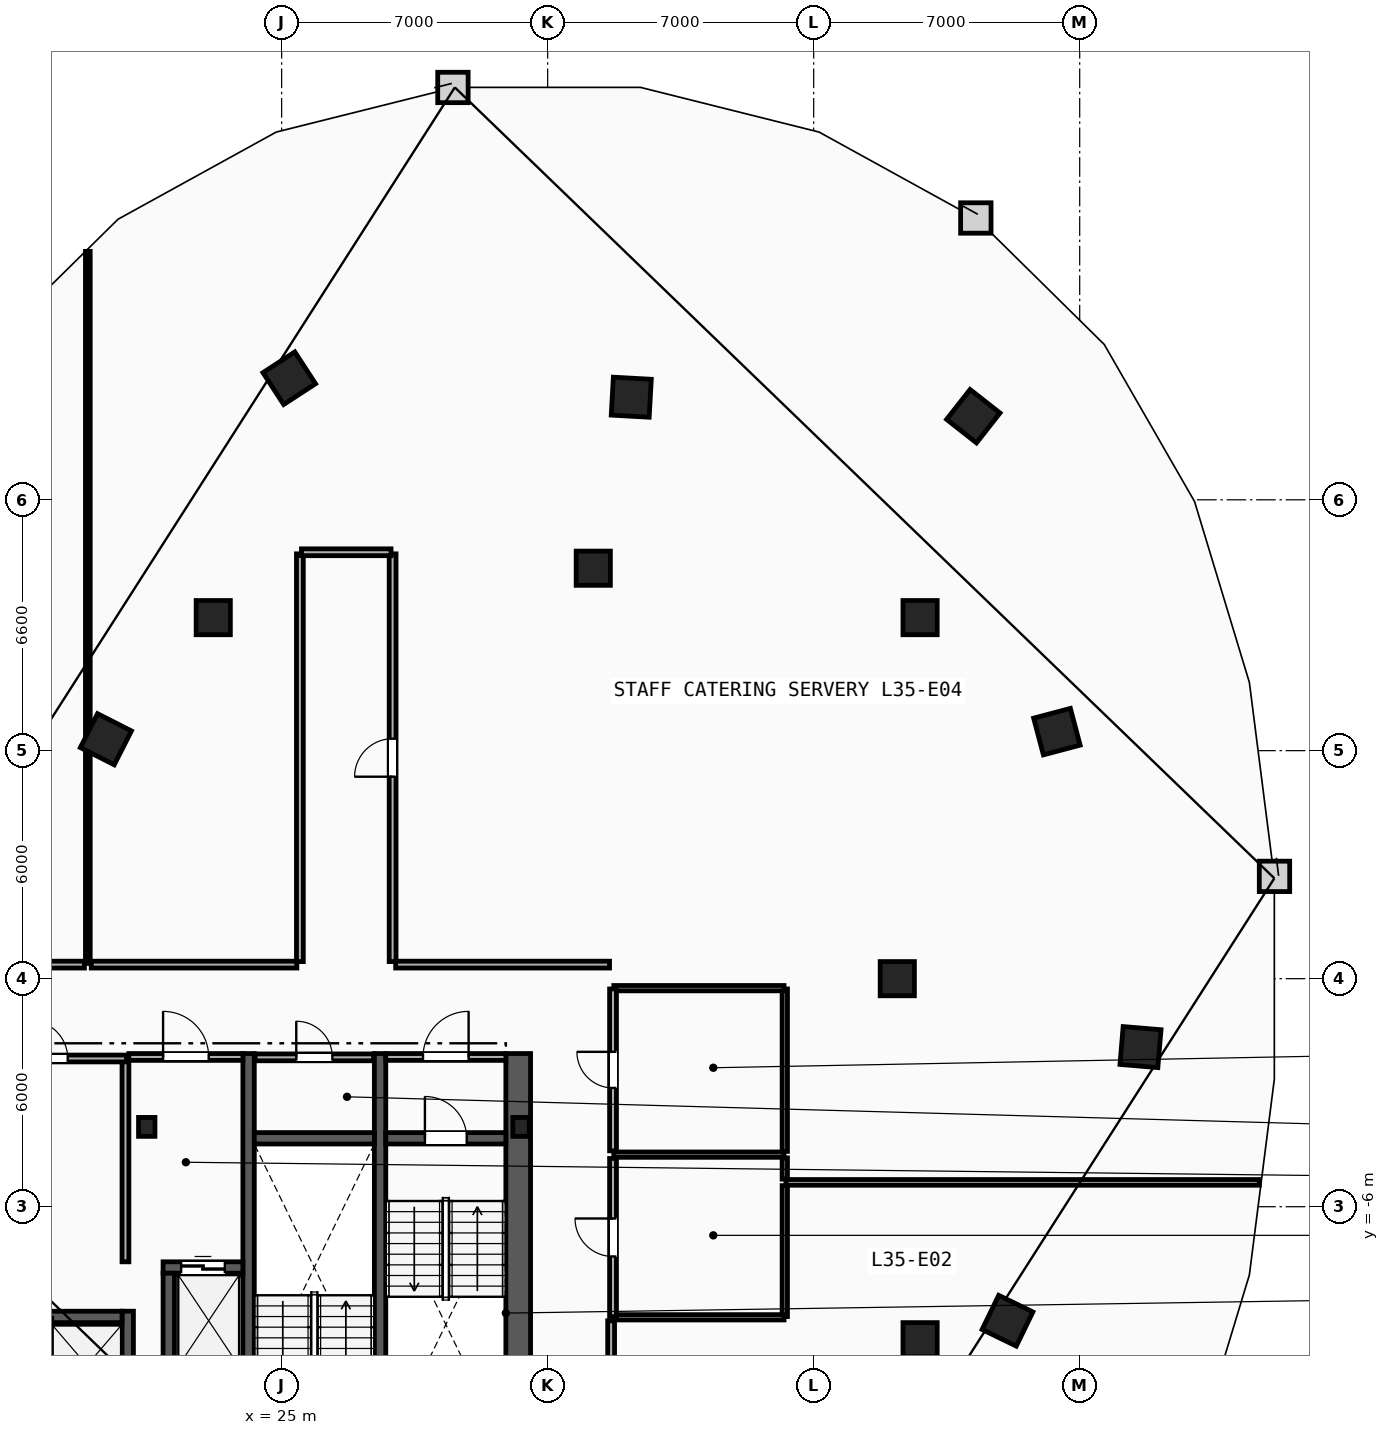
"""IFC4 building model, lengths in metres.
Left out: names, types, materials, properties, quantities, classifications, styles, units other than length and angle.
Written with IfcOpenShell. Run it as: python <this file> out.ifc"""

import sys

from ifc_helpers import new_model, si_unit, direction, frame, frame_2d, origin, origin_2d, place, context, subcontext, project, spatial, rectangle, i_section, extrude, element, fill, save


model = new_model("IFC4")
c1 = context("Model", 3, precision=1e-05, world=origin(), true_north=direction((0.0, 1.0)))
c2 = subcontext(c1, "Body", "Model", "MODEL_VIEW")
j1 = project(units=[si_unit("LENGTHUNIT", "METRE"), si_unit("PLANEANGLEUNIT", "RADIAN")], contexts=[c1])
p1 = place(None, origin())
s1 = spatial("IfcSite", under=j1, at=p1, CompositionType="ELEMENT")
p2 = place(p1, origin())
s2 = spatial("IfcBuilding", under=s1, at=p2, CompositionType="ELEMENT")
p3 = place(p2, frame((0.0, 0.0, 136.8)))
s3 = spatial("IfcBuildingStorey", under=s2, at=p3, CompositionType="ELEMENT", Elevation=136.8)
for number, where, z_axis, x_axis in (
    (1, (31.3, -3.9, 0.0), (0.0, 0.0, 1.0), (1.0, 0.0, 0.0)),
    (2, (21.45, -3.9, 0.0), (0.0, 0.0, 1.0), (1.0, 0.0, 0.0)),
):
    element("IfcColumn", number, at=place(p3, frame(where, z_axis=z_axis, x_axis=x_axis)), inside=s3, PredefinedType="COLUMN", context=c2, shape_type="SweptSolid", body=[
        extrude(i_section(OverallWidth=0.432, OverallDepth=0.498, WebThickness=0.056, FlangeThickness=0.089, FilletRadius=0.018, at=origin_2d()), origin(), (0.0, 0.0, 1.0), 3.6),
    ])
for number, where, z_axis, x_axis in (
    (3, (41.2, 0.0, 0.0), (0.0, 0.0, 1.0), (1.0, 0.0, 0.0)),
    (4, (41.8, -9.5, 0.0), (0.0, 0.0, 1.0), (1.0, 0.0, 0.0)),
    (5, (41.8, 9.5, 0.0), (0.0, 0.0, 1.0), (1.0, 0.0, 0.0)),
    (6, (33.2, 10.8, 0.0), (0.0, 0.0, 1.0), (1.0, 0.0, 0.0)),
    (7, (23.2, 9.5, 0.0), (0.0, 0.0, 1.0), (1.0, 0.0, 0.0)),
):
    element("IfcColumn", number, at=place(p3, frame(where, z_axis=z_axis, x_axis=x_axis)), inside=s3, PredefinedType="COLUMN", context=c2, shape_type="SweptSolid", body=[
        extrude(rectangle(XDim=0.9, YDim=0.9, at=origin_2d()), origin(), (0.0, 0.0, 1.0), 3.6),
    ])
for number, where, z_axis, x_axis in (
    (8, (44.1, -9.0, 0.0), (0.0, 0.0, 1.0), (0.437, 0.899, 0.0)),
    (9, (47.6, -1.8, 0.0), (0.0, 0.0, 1.0), (0.084, 0.997, 0.0)),
    (10, (45.4, 6.5, 0.0), (0.0, 0.0, 1.0), (-0.256, 0.967, 0.0)),
    (11, (43.2, 14.8, 0.0), (0.0, 0.0, 1.0), (-0.786, 0.618, 0.0)),
    (12, (34.2, 15.3, 0.0), (0.0, 0.0, 1.0), (-0.998, 0.055, 0.0)),
    (13, (25.2, 15.8, 0.0), (0.0, 0.0, 1.0), (-0.838, -0.546, 0.0)),
    (14, (20.375, 6.3, 0.0), (0.0, 0.0, 1.0), (-0.453, -0.892, 0.0)),
):
    element("IfcColumn", number, at=place(p3, frame(where, z_axis=z_axis, x_axis=x_axis)), inside=s3, PredefinedType="COLUMN", context=c2, shape_type="SweptSolid", body=[
        extrude(rectangle(XDim=1.0, YDim=1.0, at=origin_2d()), origin(), (0.0, 0.0, 1.0), 3.6),
    ])
p4 = place(p3, frame((31.225, -15.3, 0.0), z_axis=(0.0, 0.0, 1.0), x_axis=(0.0, 1.0, 0.0)))
e15 = element("IfcWall", 15, at=p4, inside=s3, PredefinedType="SHEAR", context=c2, shape_type="SweptSolid", body=[
    extrude(rectangle(XDim=13.33, YDim=0.65, at=frame_2d((6.665, 0.0))), origin(), (0.0, 0.0, 1.0), 3.36),
])
for number, where, z_axis, x_axis in (
    (16, (27.59, -12.65, 0.0), (0.0, 0.0, 1.0), (0.0, 1.0, 0.0)),
    (17, (24.13, -12.65, 0.0), (0.0, 0.0, 1.0), (0.0, 1.0, 0.0)),
):
    element("IfcWall", number, at=place(p3, frame(where, z_axis=z_axis, x_axis=x_axis)), inside=s3, PredefinedType="SHEAR", context=c2, shape_type="SweptSolid", body=[
        extrude(rectangle(XDim=10.68, YDim=0.3, at=frame_2d((5.34, 0.0))), origin(), (0.0, 0.0, 1.0), 3.36),
    ])
p5 = place(p3, frame((27.74, -4.2, 0.0), z_axis=(0.0, 0.0, 1.0), x_axis=(1.0, 0.0, 0.0)))
e18 = element("IfcWall", 18, at=p5, inside=s3, PredefinedType="SHEAR", context=c2, shape_type="SweptSolid", body=[
    extrude(rectangle(XDim=3.16, YDim=0.3, at=frame_2d((1.58, 0.0))), origin(), (0.0, 0.0, 1.0), 3.36),
])
p6 = place(p5, frame((1.03, 0.0, 0.0)))
e19 = element("IfcOpeningElement", 19, at=p6, cuts=e18, PredefinedType="OPENING", context=c2, shape_type="SweptSolid", body=[
    extrude(rectangle(XDim=1.1, YDim=2.15, at=frame_2d((0.55, 1.075))), frame((0.0, 0.16, 0.0), z_axis=(0.0, -1.0, 0.0), x_axis=(1.0, 0.0, 0.0)), (0.0, 0.0, 1.0), 0.32),
])
p7 = place(p3, frame((24.28, -4.2, 0.0), z_axis=(0.0, 0.0, 1.0), x_axis=(1.0, 0.0, 0.0)))
e20 = element("IfcWall", 20, at=p7, inside=s3, PredefinedType="SHEAR", context=c2, shape_type="SweptSolid", body=[
    extrude(rectangle(XDim=3.16, YDim=0.3, at=frame_2d((1.58, 0.0))), origin(), (0.0, 0.0, 1.0), 3.36),
])
p8 = place(p3, frame((20.89, -7.45, 0.0), z_axis=(0.0, 0.0, 1.0), x_axis=(0.0, 1.0, 0.0)))
e21 = element("IfcWall", 21, at=p8, inside=s3, PredefinedType="PARTITIONING", context=c2, shape_type="SweptSolid", body=[
    extrude(rectangle(XDim=5.3, YDim=0.18, at=frame_2d((2.65, 0.0))), origin(), (0.0, 0.0, 1.0), 3.36),
])
p9 = place(p3, frame((20.98, -2.06, 0.0), z_axis=(0.0, 0.0, 1.0), x_axis=(1.0, 0.0, 0.0)))
e22 = element("IfcWall", 22, at=p9, inside=s3, PredefinedType="PARTITIONING", context=c2, shape_type="SweptSolid", body=[
    extrude(rectangle(XDim=3.0, YDim=0.18, at=frame_2d((1.5, 0.0))), origin(), (0.0, 0.0, 1.0), 3.36),
])
p10 = place(p9, frame((0.9, 0.0, 0.0)))
e23 = element("IfcOpeningElement", 23, at=p10, cuts=e22, PredefinedType="OPENING", context=c2, shape_type="SweptSolid", body=[
    extrude(rectangle(XDim=1.2, YDim=2.15, at=frame_2d((0.6, 1.075))), frame((0.0, 0.1, 0.0), z_axis=(0.0, -1.0, 0.0), x_axis=(1.0, 0.0, 0.0)), (0.0, 0.0, 1.0), 0.2),
])
p11 = place(p3, frame((27.74, -2.06, 0.0), z_axis=(0.0, 0.0, 1.0), x_axis=(1.0, 0.0, 0.0)))
e24 = element("IfcWall", 24, at=p11, inside=s3, PredefinedType="PARTITIONING", context=c2, shape_type="SweptSolid", body=[
    extrude(rectangle(XDim=3.16, YDim=0.18, at=frame_2d((1.58, 0.0))), origin(), (0.0, 0.0, 1.0), 3.36),
])
p12 = place(p11, frame((0.98, 0.0, 0.0)))
e25 = element("IfcOpeningElement", 25, at=p12, cuts=e24, PredefinedType="OPENING", context=c2, shape_type="SweptSolid", body=[
    extrude(rectangle(XDim=1.2, YDim=2.15, at=frame_2d((0.6, 1.075))), frame((0.0, 0.1, 0.0), z_axis=(0.0, -1.0, 0.0), x_axis=(1.0, 0.0, 0.0)), (0.0, 0.0, 1.0), 0.2),
])
p13 = place(p3, frame((21.88, -7.6, 0.0), z_axis=(0.0, 0.0, 1.0), x_axis=(1.0, 0.0, 0.0)))
e26 = element("IfcWall", 26, at=p13, inside=s3, PredefinedType="SHEAR", context=c2, shape_type="SweptSolid", body=[
    extrude(rectangle(XDim=2.1, YDim=0.3, at=frame_2d((1.05, 0.0))), origin(), (0.0, 0.0, 1.0), 3.36),
])
p14 = place(p13, frame((0.475, 0.0, 0.0)))
e27 = element("IfcOpeningElement", 27, at=p14, cuts=e26, PredefinedType="OPENING", context=c2, shape_type="SweptSolid", body=[
    extrude(rectangle(XDim=1.15, YDim=2.2, at=frame_2d((0.575, 1.1))), frame((0.0, 0.16, 0.0), z_axis=(0.0, -1.0, 0.0), x_axis=(1.0, 0.0, 0.0)), (0.0, 0.0, 1.0), 0.32),
])
p15 = place(p3, frame((22.03, -10.25, 0.0), z_axis=(0.0, 0.0, 1.0), x_axis=(0.0, 1.0, 0.0)))
e28 = element("IfcWall", 28, at=p15, inside=s3, PredefinedType="SHEAR", context=c2, shape_type="SweptSolid", body=[
    extrude(rectangle(XDim=2.5, YDim=0.3, at=frame_2d((1.25, 0.0))), origin(), (0.0, 0.0, 1.0), 3.36),
])
p16 = place(p3, frame((20.95, -14.0, 0.0), z_axis=(0.0, 0.0, 1.0), x_axis=(0.0, 1.0, 0.0)))
e29 = element("IfcWall", 29, at=p16, inside=s3, PredefinedType="SHEAR", context=c2, shape_type="SweptSolid", body=[
    extrude(rectangle(XDim=5.25, YDim=0.3, at=frame_2d((2.625, 0.0))), origin(), (0.0, 0.0, 1.0), 3.36),
])
p17 = place(p3, frame((18.65, -8.9, 0.0), z_axis=(0.0, 0.0, 1.0), x_axis=(1.0, 0.0, 0.0)))
e30 = element("IfcWall", 30, at=p17, inside=s3, PredefinedType="SHEAR", context=c2, shape_type="SweptSolid", body=[
    extrude(rectangle(XDim=2.15, YDim=0.3, at=frame_2d((1.075, 0.0))), origin(), (0.0, 0.0, 1.0), 3.36),
])
p18 = place(p3, frame((24.3, -2.07, 0.0), z_axis=(0.0, 0.0, 1.0), x_axis=(1.0, 0.0, 0.0)))
e31 = element("IfcWall", 31, at=p18, inside=s3, PredefinedType="PARTITIONING", context=c2, shape_type="SweptSolid", body=[
    extrude(rectangle(XDim=3.12, YDim=0.18, at=frame_2d((1.56, 0.0))), origin(), (0.0, 0.0, 1.0), 3.36),
])
p19 = place(p18, frame((1.085, 0.0, 0.0)))
e32 = element("IfcOpeningElement", 32, at=p19, cuts=e31, PredefinedType="OPENING", context=c2, shape_type="SweptSolid", body=[
    extrude(rectangle(XDim=0.95, YDim=2.1, at=frame_2d((0.475, 1.05))), frame((0.0, 0.1, 0.0), z_axis=(0.0, -1.0, 0.0), x_axis=(1.0, 0.0, 0.0)), (0.0, 0.0, 1.0), 0.2),
])
p20 = place(p3, frame((38.24, -8.89, 0.0), z_axis=(0.0, 0.0, 1.0), x_axis=(0.0, 1.0, 0.0)))
e33 = element("IfcWall", 33, at=p20, inside=s3, PredefinedType="PARTITIONING", context=c2, shape_type="SweptSolid", body=[
    extrude(rectangle(XDim=3.445, YDim=0.14, at=frame_2d((1.722, 0.0))), origin(), (0.0, 0.0, 1.0), 3.36),
])
p21 = place(p3, frame((38.24, -5.275, 0.0), z_axis=(0.0, 0.0, 1.0), x_axis=(0.0, 1.0, 0.0)))
e34 = element("IfcWall", 34, at=p21, inside=s3, PredefinedType="PARTITIONING", context=c2, shape_type="SweptSolid", body=[
    extrude(rectangle(XDim=0.56, YDim=0.14, at=frame_2d((0.28, 0.0))), origin(), (0.0, 0.0, 1.0), 3.36),
])
p22 = place(p3, frame((38.24, -4.545, 0.0), z_axis=(0.0, 0.0, 1.0), x_axis=(0.0, 1.0, 0.0)))
e35 = element("IfcWall", 35, at=p22, inside=s3, PredefinedType="PARTITIONING", context=c2, shape_type="SweptSolid", body=[
    extrude(rectangle(XDim=4.275, YDim=0.14, at=frame_2d((2.137, 0.0))), origin(), (0.0, 0.0, 1.0), 3.36),
])
for number, where, z_axis, x_axis in (
    (36, (33.74, -0.25, 0.0), (0.0, 0.0, 1.0), (1.0, 0.0, 0.0)),
    (37, (33.74, -4.63, 0.0), (0.0, 0.0, 1.0), (1.0, 0.0, 0.0)),
    (38, (33.74, -8.91, 0.0), (0.0, 0.0, 1.0), (1.0, 0.0, 0.0)),
):
    element("IfcWall", number, at=place(p3, frame(where, z_axis=z_axis, x_axis=x_axis)), inside=s3, PredefinedType="PARTITIONING", context=c2, shape_type="SweptSolid", body=[
        extrude(rectangle(XDim=4.48, YDim=0.14, at=frame_2d((2.24, 0.0))), origin(), (0.0, 0.0, 1.0), 3.36),
    ])
p23 = place(p3, frame((33.72, -4.53, 0.0), z_axis=(0.0, 0.0, 1.0), x_axis=(0.0, 1.0, 0.0)))
e39 = element("IfcWall", 39, at=p23, inside=s3, PredefinedType="PARTITIONING", context=c2, shape_type="SweptSolid", body=[
    extrude(rectangle(XDim=4.26, YDim=0.18, at=frame_2d((2.13, 0.0))), origin(), (0.0, 0.0, 1.0), 3.36),
])
p24 = place(p23, frame((1.655, 0.0, 0.0)))
e40 = element("IfcOpeningElement", 40, at=p24, cuts=e39, PredefinedType="OPENING", context=c2, shape_type="SweptSolid", body=[
    extrude(rectangle(XDim=0.95, YDim=2.1, at=frame_2d((0.475, 1.05))), frame((0.0, 0.1, 0.0), z_axis=(0.0, -1.0, 0.0), x_axis=(1.0, 0.0, 0.0)), (0.0, 0.0, 1.0), 0.2),
])
p25 = place(p3, frame((33.72, -8.89, 0.0), z_axis=(0.0, 0.0, 1.0), x_axis=(0.0, 1.0, 0.0)))
e41 = element("IfcWall", 41, at=p25, inside=s3, PredefinedType="PARTITIONING", context=c2, shape_type="SweptSolid", body=[
    extrude(rectangle(XDim=4.16, YDim=0.18, at=frame_2d((2.08, 0.0))), origin(), (0.0, 0.0, 1.0), 3.36),
])
p26 = place(p25, frame((1.58, 0.0, 0.0)))
e42 = element("IfcOpeningElement", 42, at=p26, cuts=e41, PredefinedType="OPENING", context=c2, shape_type="SweptSolid", body=[
    extrude(rectangle(XDim=1.0, YDim=2.15, at=frame_2d((0.5, 1.075))), frame((0.0, 0.1, 0.0), z_axis=(0.0, -1.0, 0.0), x_axis=(1.0, 0.0, 0.0)), (0.0, 0.0, 1.0), 0.2),
])
p27 = place(p3, frame((19.9, 0.4, 0.0), z_axis=(0.0, 0.0, 1.0), x_axis=(0.0, 1.0, 0.0)))
e43 = element("IfcWall", 43, at=p27, inside=s3, PredefinedType="PARTITIONING", context=c2, shape_type="SweptSolid", body=[
    extrude(rectangle(XDim=18.737, YDim=0.125, at=frame_2d((9.368, 0.0))), origin(), (0.0, 0.0, 1.0), 3.36),
])
p28 = place(p3, frame((38.27, -5.36, 0.0), z_axis=(0.0, 0.0, 1.0), x_axis=(1.0, 0.0, 0.0)))
e44 = element("IfcWall", 44, at=p28, inside=s3, PredefinedType="PARTITIONING", context=c2, shape_type="SweptSolid", body=[
    extrude(rectangle(XDim=12.455, YDim=0.15, at=frame_2d((6.228, 0.0))), origin(), (0.0, 0.0, 1.0), 3.36),
])
p29 = place(p3, frame((33.67, -10.27, 0.0), z_axis=(0.0, 0.0, 1.0), x_axis=(0.0, 1.0, 0.0)))
e45 = element("IfcWall", 45, at=p29, inside=s3, PredefinedType="PARTITIONING", context=c2, shape_type="SweptSolid", body=[
    extrude(rectangle(XDim=1.269, YDim=0.18, at=frame_2d((0.634, 0.0))), origin(), (0.0, 0.0, 1.0), 3.36),
])
p30 = place(p3, frame((16.822, -2.1, 0.0), z_axis=(0.0, 0.0, 1.0), x_axis=(1.0, 0.0, 0.0)))
e46 = element("IfcWall", 46, at=p30, inside=s3, PredefinedType="PARTITIONING", context=c2, shape_type="SweptSolid", body=[
    extrude(rectangle(XDim=4.098, YDim=0.18, at=frame_2d((2.049, 0.0))), origin(), (0.0, 0.0, 1.0), 3.36),
])
p31 = place(p30, frame((1.549, 0.0, 0.0)))
e47 = element("IfcOpeningElement", 47, at=p31, cuts=e46, PredefinedType="OPENING", context=c2, shape_type="SweptSolid", body=[
    extrude(rectangle(XDim=1.0, YDim=2.15, at=frame_2d((0.5, 1.075))), frame((0.0, 0.1, 0.0), z_axis=(0.0, -1.0, 0.0), x_axis=(1.0, 0.0, 0.0)), (0.0, 0.0, 1.0), 0.2),
])
p32 = place(p3, frame((19.81, 0.37, 0.0), z_axis=(0.0, 0.0, 1.0), x_axis=(-1.0, 0.0, 0.0)))
e48 = element("IfcWall", 48, at=p32, inside=s3, PredefinedType="PARTITIONING", context=c2, shape_type="SweptSolid", body=[
    extrude(rectangle(XDim=2.989, YDim=0.18, at=frame_2d((1.494, 0.0))), origin(), (0.0, 0.0, 1.0), 3.36),
])
p33 = place(p3, frame((27.92, 0.45, 0.0), z_axis=(0.0, 0.0, 1.0), x_axis=(0.0, 1.0, 0.0)))
e49 = element("IfcWall", 49, at=p33, inside=s3, PredefinedType="PARTITIONING", context=c2, shape_type="SweptSolid", body=[
    extrude(rectangle(XDim=10.729, YDim=0.18, at=frame_2d((5.364, 0.0))), origin(), (0.0, 0.0, 1.0), 3.36),
])
p34 = place(p33, frame((4.864, 0.0, 0.0)))
e50 = element("IfcOpeningElement", 50, at=p34, cuts=e49, PredefinedType="OPENING", context=c2, shape_type="SweptSolid", body=[
    extrude(rectangle(XDim=1.0, YDim=2.15, at=frame_2d((0.5, 1.075))), frame((0.0, 0.1, 0.0), z_axis=(0.0, -1.0, 0.0), x_axis=(1.0, 0.0, 0.0)), (0.0, 0.0, 1.0), 0.2),
])
p35 = place(p3, frame((25.48, 11.178, 0.0), z_axis=(0.0, 0.0, 1.0), x_axis=(0.0, -1.0, 0.0)))
e51 = element("IfcWall", 51, at=p35, inside=s3, PredefinedType="PARTITIONING", context=c2, shape_type="SweptSolid", body=[
    extrude(rectangle(XDim=10.729, YDim=0.18, at=frame_2d((5.364, 0.0))), origin(), (0.0, 0.0, 1.0), 3.36),
])
p36 = place(p3, frame((33.628, 0.37, 0.0), z_axis=(0.0, 0.0, 1.0), x_axis=(-1.0, 0.0, 0.0)))
e52 = element("IfcWall", 52, at=p36, inside=s3, PredefinedType="PARTITIONING", context=c2, shape_type="SweptSolid", body=[
    extrude(rectangle(XDim=5.628, YDim=0.18, at=frame_2d((2.814, 0.0))), origin(), (0.0, 0.0, 1.0), 3.36),
])
p37 = place(p3, frame((25.4, 0.37, 0.0), z_axis=(0.0, 0.0, 1.0), x_axis=(-1.0, 0.0, 0.0)))
e53 = element("IfcWall", 53, at=p37, inside=s3, PredefinedType="PARTITIONING", context=c2, shape_type="SweptSolid", body=[
    extrude(rectangle(XDim=5.41, YDim=0.18, at=frame_2d((2.705, 0.0))), origin(), (0.0, 0.0, 1.0), 3.36),
])
p38 = place(p3, frame((27.878, 11.22, 0.0), z_axis=(0.0, 0.0, 1.0), x_axis=(-1.0, 0.0, 0.0)))
e54 = element("IfcWall", 54, at=p38, inside=s3, PredefinedType="PARTITIONING", context=c2, shape_type="SweptSolid", body=[
    extrude(rectangle(XDim=2.357, YDim=0.18, at=frame_2d((1.178, 0.0))), origin(), (0.0, 0.0, 1.0), 3.36),
])
p39 = place(p6, origin())
e55 = element("IfcDoor", 55, at=p39, inside=s3, OperationType="SINGLE_SWING_LEFT", PredefinedType="DOOR", context=c2, shape_type="SweptSolid", body=[
    extrude(rectangle(XDim=1.1, YDim=2.15, at=frame_2d((0.55, 1.075))), frame((0.0, 0.025, 0.0), z_axis=(0.0, -1.0, 0.0), x_axis=(1.0, 0.0, 0.0)), (0.0, 0.0, 1.0), 0.05),
])
fill(e19, e55)
p40 = place(p10, origin())
e56 = element("IfcDoor", 56, at=p40, inside=s3, OperationType="SINGLE_SWING_LEFT", PredefinedType="DOOR", context=c2, shape_type="SweptSolid", body=[
    extrude(rectangle(XDim=1.2, YDim=2.15, at=frame_2d((0.6, 1.075))), frame((0.0, 0.025, 0.0), z_axis=(0.0, -1.0, 0.0), x_axis=(1.0, 0.0, 0.0)), (0.0, 0.0, 1.0), 0.05),
])
fill(e23, e56)
p41 = place(p12, origin())
e57 = element("IfcDoor", 57, at=p41, inside=s3, OperationType="SINGLE_SWING_RIGHT", PredefinedType="DOOR", context=c2, shape_type="SweptSolid", body=[
    extrude(rectangle(XDim=1.2, YDim=2.15, at=frame_2d((0.6, 1.075))), frame((0.0, 0.025, 0.0), z_axis=(0.0, -1.0, 0.0), x_axis=(1.0, 0.0, 0.0)), (0.0, 0.0, 1.0), 0.05),
])
fill(e25, e57)
p42 = place(p14, origin())
e58 = element("IfcDoor", 58, at=p42, inside=s3, OperationType="SLIDING_TO_LEFT", PredefinedType="TRAPDOOR", context=c2, shape_type="SweptSolid", body=[
    extrude(rectangle(XDim=1.15, YDim=2.2, at=frame_2d((0.575, 1.1))), frame((0.0, 0.025, 0.0), z_axis=(0.0, -1.0, 0.0), x_axis=(1.0, 0.0, 0.0)), (0.0, 0.0, 1.0), 0.05),
])
fill(e27, e58)
p43 = place(p34, origin())
e59 = element("IfcDoor", 59, at=p43, inside=s3, OperationType="SINGLE_SWING_LEFT", PredefinedType="DOOR", context=c2, shape_type="SweptSolid", body=[
    extrude(rectangle(XDim=1.0, YDim=2.15, at=frame_2d((0.5, 1.075))), frame((0.0, 0.025, 0.0), z_axis=(0.0, -1.0, 0.0), x_axis=(1.0, 0.0, 0.0)), (0.0, 0.0, 1.0), 0.05),
])
fill(e50, e59)
p44 = place(p24, origin())
e60 = element("IfcDoor", 60, at=p44, inside=s3, OperationType="SINGLE_SWING_RIGHT", PredefinedType="DOOR", context=c2, shape_type="SweptSolid", body=[
    extrude(rectangle(XDim=0.95, YDim=2.1, at=frame_2d((0.475, 1.05))), frame((0.0, 0.025, 0.0), z_axis=(0.0, -1.0, 0.0), x_axis=(1.0, 0.0, 0.0)), (0.0, 0.0, 1.0), 0.05),
])
fill(e40, e60)
p45 = place(p26, origin())
e61 = element("IfcDoor", 61, at=p45, inside=s3, OperationType="SINGLE_SWING_RIGHT", PredefinedType="DOOR", context=c2, shape_type="SweptSolid", body=[
    extrude(rectangle(XDim=1.0, YDim=2.15, at=frame_2d((0.5, 1.075))), frame((0.0, 0.025, 0.0), z_axis=(0.0, -1.0, 0.0), x_axis=(1.0, 0.0, 0.0)), (0.0, 0.0, 1.0), 0.05),
])
fill(e42, e61)
p46 = place(p31, origin())
e62 = element("IfcDoor", 62, at=p46, inside=s3, OperationType="SINGLE_SWING_LEFT", PredefinedType="DOOR", context=c2, shape_type="SweptSolid", body=[
    extrude(rectangle(XDim=1.0, YDim=2.15, at=frame_2d((0.5, 1.075))), frame((0.0, 0.025, 0.0), z_axis=(0.0, -1.0, 0.0), x_axis=(1.0, 0.0, 0.0)), (0.0, 0.0, 1.0), 0.05),
])
fill(e47, e62)
p47 = place(p19, origin())
e63 = element("IfcDoor", 63, at=p47, inside=s3, OperationType="SINGLE_SWING_LEFT", PredefinedType="DOOR", context=c2, shape_type="SweptSolid", body=[
    extrude(rectangle(XDim=0.95, YDim=2.1, at=frame_2d((0.475, 1.05))), frame((0.0, 0.025, 0.0), z_axis=(0.0, -1.0, 0.0), x_axis=(1.0, 0.0, 0.0)), (0.0, 0.0, 1.0), 0.05),
])
fill(e32, e63)
save(model, sys.argv[1])
